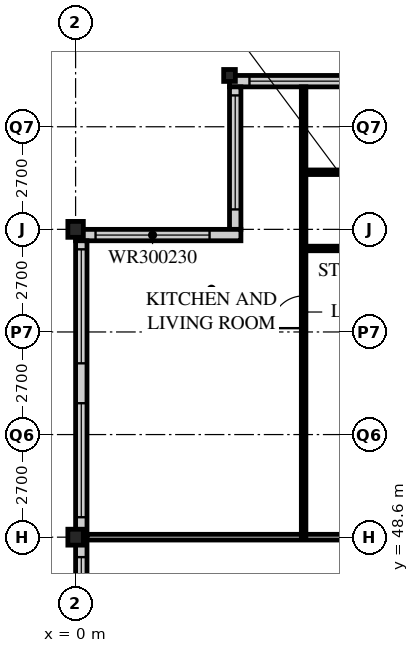
"""IFC4 building model, lengths in metres.
Left out: names, types, materials, properties, quantities, classifications, styles, units other than length and angle.
Written with IfcOpenShell. Run it as: python <this file> out.ifc"""

import sys

from ifc_helpers import new_model, si_unit, direction, frame, frame_2d, origin, origin_2d, place, context, subcontext, project, spatial, rectangle, i_section, extrude, element, fill, save


model = new_model("IFC4")
c1 = context("Model", 3, precision=1e-05, world=origin(), true_north=direction((0.0, 1.0)))
c2 = subcontext(c1, "Body", "Model", "MODEL_VIEW")
j1 = project(units=[si_unit("LENGTHUNIT", "METRE"), si_unit("PLANEANGLEUNIT", "RADIAN")], contexts=[c1])
p1 = place(None, origin())
s1 = spatial("IfcSite", under=j1, at=p1, CompositionType="ELEMENT")
p2 = place(p1, origin())
s2 = spatial("IfcBuilding", under=s1, at=p2, CompositionType="ELEMENT")
p3 = place(p2, frame((0.0, 0.0, 285.3)))
s3 = spatial("IfcBuildingStorey", under=s2, at=p3, CompositionType="ELEMENT", Elevation=285.3)
for number, where, z_axis, x_axis in (
    (1, (0.0, 48.6, 0.0), (0.0, 0.0, 1.0), (1.0, 0.0, 0.0)),
    (2, (0.0, 56.7, 0.0), (0.0, 0.0, 1.0), (1.0, 0.0, 0.0)),
):
    element("IfcColumn", number, at=place(p3, frame(where, z_axis=z_axis, x_axis=x_axis)), inside=s3, PredefinedType="COLUMN", context=c2, shape_type="SweptSolid", body=[
        extrude(i_section(OverallWidth=0.407, OverallDepth=0.419, WebThickness=0.031, FlangeThickness=0.049, FilletRadius=0.015, at=origin_2d()), origin(), (0.0, 0.0, 1.0), 3.9),
    ])
p4 = place(p3, frame((4.05, 60.75, 0.0), z_axis=(0.0, 0.0, 1.0), x_axis=(1.0, 0.0, 0.0)))
e3 = element("IfcColumn", 3, at=p4, inside=s3, PredefinedType="COLUMN", context=c2, shape_type="SweptSolid", body=[
    extrude(i_section(OverallWidth=0.307, OverallDepth=0.314, WebThickness=0.012, FlangeThickness=0.019, FilletRadius=0.015, at=origin_2d()), origin(), (0.0, 0.0, 1.0), 3.9),
])
p5 = place(p3, frame((8.4, 60.6, 0.0), z_axis=(0.0, 0.0, 1.0), x_axis=(-1.0, 0.0, 0.0)))
e4 = element("IfcWall", 4, at=p5, inside=s3, PredefinedType="SOLIDWALL", context=c2, shape_type="SweptSolid", body=[
    extrude(rectangle(XDim=4.35, YDim=0.3, at=frame_2d((2.175, 0.0))), origin(), (0.0, 0.0, 1.0), 3.69),
])
p6 = place(p5, frame((0.825, 0.0, 0.6)))
e5 = element("IfcOpeningElement", 5, at=p6, cuts=e4, PredefinedType="OPENING", context=c2, shape_type="SweptSolid", body=[
    extrude(rectangle(XDim=3.0, YDim=2.3, at=frame_2d((1.5, 1.15))), frame((0.0, 0.16, 0.0), z_axis=(0.0, -1.0, 0.0), x_axis=(1.0, 0.0, 0.0)), (0.0, 0.0, 1.0), 0.32),
])
p7 = place(p3, frame((4.2, 60.45, 0.0), z_axis=(0.0, 0.0, 1.0), x_axis=(0.0, -1.0, 0.0)))
e6 = element("IfcWall", 6, at=p7, inside=s3, PredefinedType="SOLIDWALL", context=c2, shape_type="SweptSolid", body=[
    extrude(rectangle(XDim=3.75, YDim=0.3, at=frame_2d((1.875, 0.0))), origin(), (0.0, 0.0, 1.0), 3.69),
])
p8 = place(p7, frame((0.225, 0.0, 0.6)))
e7 = element("IfcOpeningElement", 7, at=p8, cuts=e6, PredefinedType="OPENING", context=c2, shape_type="SweptSolid", body=[
    extrude(rectangle(XDim=3.0, YDim=2.3, at=frame_2d((1.5, 1.15))), frame((0.0, 0.16, 0.0), z_axis=(0.0, -1.0, 0.0), x_axis=(1.0, 0.0, 0.0)), (0.0, 0.0, 1.0), 0.32),
])
p9 = place(p3, frame((4.35, 56.55, 0.0), z_axis=(0.0, 0.0, 1.0), x_axis=(-1.0, 0.0, 0.0)))
e8 = element("IfcWall", 8, at=p9, inside=s3, PredefinedType="SOLIDWALL", context=c2, shape_type="SweptSolid", body=[
    extrude(rectangle(XDim=4.35, YDim=0.3, at=frame_2d((2.175, 0.0))), origin(), (0.0, 0.0, 1.0), 3.69),
])
p10 = place(p9, frame((0.825, 0.0, 0.6)))
e9 = element("IfcOpeningElement", 9, at=p10, cuts=e8, PredefinedType="OPENING", context=c2, shape_type="SweptSolid", body=[
    extrude(rectangle(XDim=3.0, YDim=2.3, at=frame_2d((1.5, 1.15))), frame((0.0, 0.16, 0.0), z_axis=(0.0, -1.0, 0.0), x_axis=(1.0, 0.0, 0.0)), (0.0, 0.0, 1.0), 0.32),
])
p11 = place(p3, frame((0.15, 56.4, 0.0), z_axis=(0.0, 0.0, 1.0), x_axis=(0.0, -1.0, 0.0)))
e10 = element("IfcWall", 10, at=p11, inside=s3, PredefinedType="SOLIDWALL", context=c2, shape_type="SweptSolid", body=[
    extrude(rectangle(XDim=32.1, YDim=0.3, at=frame_2d((16.05, 0.0))), origin(), (0.0, 0.0, 1.0), 3.69),
])
p12 = place(p11, frame((0.225, 0.0, 0.6)))
e11 = element("IfcOpeningElement", 11, at=p12, cuts=e10, PredefinedType="OPENING", context=c2, shape_type="SweptSolid", body=[
    extrude(rectangle(XDim=3.0, YDim=2.4, at=frame_2d((1.5, 1.2))), frame((0.0, 0.16, 0.0), z_axis=(0.0, -1.0, 0.0), x_axis=(1.0, 0.0, 0.0)), (0.0, 0.0, 1.0), 0.32),
])
p13 = place(p11, frame((4.275, 0.0, 0.6)))
e12 = element("IfcOpeningElement", 12, at=p13, cuts=e10, PredefinedType="OPENING", context=c2, shape_type="SweptSolid", body=[
    extrude(rectangle(XDim=3.0, YDim=2.4, at=frame_2d((1.5, 1.2))), frame((0.0, 0.16, 0.0), z_axis=(0.0, -1.0, 0.0), x_axis=(1.0, 0.0, 0.0)), (0.0, 0.0, 1.0), 0.32),
])
p14 = place(p11, frame((8.325, 0.0, 0.6)))
e13 = element("IfcOpeningElement", 13, at=p14, cuts=e10, PredefinedType="OPENING", context=c2, shape_type="SweptSolid", body=[
    extrude(rectangle(XDim=3.0, YDim=2.4, at=frame_2d((1.5, 1.2))), frame((0.0, 0.16, 0.0), z_axis=(0.0, -1.0, 0.0), x_axis=(1.0, 0.0, 0.0)), (0.0, 0.0, 1.0), 0.32),
])
p15 = place(p11, frame((12.375, 0.0, 0.6)))
e14 = element("IfcOpeningElement", 14, at=p15, cuts=e10, PredefinedType="OPENING", context=c2, shape_type="SweptSolid", body=[
    extrude(rectangle(XDim=3.0, YDim=2.4, at=frame_2d((1.5, 1.2))), frame((0.0, 0.16, 0.0), z_axis=(0.0, -1.0, 0.0), x_axis=(1.0, 0.0, 0.0)), (0.0, 0.0, 1.0), 0.32),
])
p16 = place(p11, frame((16.425, 0.0, 0.6)))
e15 = element("IfcOpeningElement", 15, at=p16, cuts=e10, PredefinedType="OPENING", context=c2, shape_type="SweptSolid", body=[
    extrude(rectangle(XDim=3.0, YDim=2.4, at=frame_2d((1.5, 1.2))), frame((0.0, 0.16, 0.0), z_axis=(0.0, -1.0, 0.0), x_axis=(1.0, 0.0, 0.0)), (0.0, 0.0, 1.0), 0.32),
])
p17 = place(p11, frame((20.475, 0.0, 0.6)))
e16 = element("IfcOpeningElement", 16, at=p17, cuts=e10, PredefinedType="OPENING", context=c2, shape_type="SweptSolid", body=[
    extrude(rectangle(XDim=3.0, YDim=2.4, at=frame_2d((1.5, 1.2))), frame((0.0, 0.16, 0.0), z_axis=(0.0, -1.0, 0.0), x_axis=(1.0, 0.0, 0.0)), (0.0, 0.0, 1.0), 0.32),
])
p18 = place(p11, frame((24.525, 0.0, 0.6)))
e17 = element("IfcOpeningElement", 17, at=p18, cuts=e10, PredefinedType="OPENING", context=c2, shape_type="SweptSolid", body=[
    extrude(rectangle(XDim=3.0, YDim=2.4, at=frame_2d((1.5, 1.2))), frame((0.0, 0.16, 0.0), z_axis=(0.0, -1.0, 0.0), x_axis=(1.0, 0.0, 0.0)), (0.0, 0.0, 1.0), 0.32),
])
p19 = place(p11, frame((28.575, 0.0, 0.6)))
e18 = element("IfcOpeningElement", 18, at=p19, cuts=e10, PredefinedType="OPENING", context=c2, shape_type="SweptSolid", body=[
    extrude(rectangle(XDim=3.0, YDim=2.4, at=frame_2d((1.5, 1.2))), frame((0.0, 0.16, 0.0), z_axis=(0.0, -1.0, 0.0), x_axis=(1.0, 0.0, 0.0)), (0.0, 0.0, 1.0), 0.32),
])
p20 = place(p3, frame((0.3, 48.6, 0.0), z_axis=(0.0, 0.0, 1.0), x_axis=(1.0, 0.0, 0.0)))
e19 = element("IfcWall", 19, at=p20, inside=s3, PredefinedType="PARTITIONING", context=c2, shape_type="SweptSolid", body=[
    extrude(rectangle(XDim=11.85, YDim=0.15, at=frame_2d((5.925, 0.0))), origin(), (0.0, 0.0, 1.0), 3.078),
])
p21 = place(p3, frame((6.0, 48.6, 0.0), z_axis=(0.0, 0.0, 1.0), x_axis=(0.0, 1.0, 0.0)))
e20 = element("IfcWall", 20, at=p21, inside=s3, PredefinedType="PARTITIONING", context=c2, shape_type="SweptSolid", body=[
    extrude(rectangle(XDim=11.85, YDim=0.12, at=frame_2d((5.925, 0.0))), origin(), (0.0, 0.0, 1.0), 3.69),
])
p22 = place(p21, frame((5.5, 0.0, 0.0)))
e21 = element("IfcOpeningElement", 21, at=p22, cuts=e20, PredefinedType="OPENING", context=c2, shape_type="SweptSolid", body=[
    extrude(rectangle(XDim=0.85, YDim=2.1, at=frame_2d((0.425, 1.05))), frame((0.0, 0.07, 0.0), z_axis=(0.0, -1.0, 0.0), x_axis=(1.0, 0.0, 0.0)), (0.0, 0.0, 1.0), 0.14),
])
for number, where, z_axis, x_axis in (
    (22, (6.0, 56.197, 0.0), (0.0, 0.0, 1.0), (1.0, 0.0, 0.0)),
    (23, (6.0, 58.203, 0.0), (0.0, 0.0, 1.0), (1.0, 0.0, 0.0)),
):
    element("IfcWall", number, at=place(p3, frame(where, z_axis=z_axis, x_axis=x_axis)), inside=s3, PredefinedType="PARTITIONING", context=c2, shape_type="SweptSolid", body=[
        extrude(rectangle(XDim=2.363, YDim=0.12, at=frame_2d((1.182, 0.0))), origin(), (0.0, 0.0, 1.0), 3.69),
    ])
p23 = place(p6, origin())
e24 = element("IfcWindow", 24, at=p23, inside=s3, PartitioningType="SINGLE_PANEL", PredefinedType="WINDOW", context=c2, shape_type="SweptSolid", body=[
    extrude(rectangle(XDim=3.0, YDim=2.3, at=frame_2d((1.5, 1.15))), frame((0.0, 0.03, 0.0), z_axis=(0.0, -1.0, 0.0), x_axis=(1.0, 0.0, 0.0)), (0.0, 0.0, 1.0), 0.06),
])
fill(e5, e24)
p24 = place(p8, origin())
e25 = element("IfcWindow", 25, at=p24, inside=s3, PartitioningType="SINGLE_PANEL", PredefinedType="WINDOW", context=c2, shape_type="SweptSolid", body=[
    extrude(rectangle(XDim=3.0, YDim=2.3, at=frame_2d((1.5, 1.15))), frame((0.0, 0.03, 0.0), z_axis=(0.0, -1.0, 0.0), x_axis=(1.0, 0.0, 0.0)), (0.0, 0.0, 1.0), 0.06),
])
fill(e7, e25)
p25 = place(p10, origin())
e26 = element("IfcWindow", 26, at=p25, inside=s3, PartitioningType="SINGLE_PANEL", PredefinedType="WINDOW", context=c2, shape_type="SweptSolid", body=[
    extrude(rectangle(XDim=3.0, YDim=2.3, at=frame_2d((1.5, 1.15))), frame((0.0, 0.03, 0.0), z_axis=(0.0, -1.0, 0.0), x_axis=(1.0, 0.0, 0.0)), (0.0, 0.0, 1.0), 0.06),
])
fill(e9, e26)
p26 = place(p12, origin())
e27 = element("IfcWindow", 27, at=p26, inside=s3, PartitioningType="SINGLE_PANEL", PredefinedType="WINDOW", context=c2, shape_type="SweptSolid", body=[
    extrude(rectangle(XDim=3.0, YDim=2.4, at=frame_2d((1.5, 1.2))), frame((0.0, 0.03, 0.0), z_axis=(0.0, -1.0, 0.0), x_axis=(1.0, 0.0, 0.0)), (0.0, 0.0, 1.0), 0.06),
])
fill(e11, e27)
p27 = place(p13, origin())
e28 = element("IfcWindow", 28, at=p27, inside=s3, PartitioningType="SINGLE_PANEL", PredefinedType="WINDOW", context=c2, shape_type="SweptSolid", body=[
    extrude(rectangle(XDim=3.0, YDim=2.4, at=frame_2d((1.5, 1.2))), frame((0.0, 0.03, 0.0), z_axis=(0.0, -1.0, 0.0), x_axis=(1.0, 0.0, 0.0)), (0.0, 0.0, 1.0), 0.06),
])
fill(e12, e28)
p28 = place(p14, origin())
e29 = element("IfcWindow", 29, at=p28, inside=s3, PartitioningType="SINGLE_PANEL", PredefinedType="WINDOW", context=c2, shape_type="SweptSolid", body=[
    extrude(rectangle(XDim=3.0, YDim=2.4, at=frame_2d((1.5, 1.2))), frame((0.0, 0.03, 0.0), z_axis=(0.0, -1.0, 0.0), x_axis=(1.0, 0.0, 0.0)), (0.0, 0.0, 1.0), 0.06),
])
fill(e13, e29)
p29 = place(p22, origin())
e30 = element("IfcDoor", 30, at=p29, inside=s3, OperationType="SINGLE_SWING_LEFT", PredefinedType="DOOR", context=c2, shape_type="SweptSolid", body=[
    extrude(rectangle(XDim=0.85, YDim=2.1, at=frame_2d((0.425, 1.05))), frame((0.0, 0.025, 0.0), z_axis=(0.0, -1.0, 0.0), x_axis=(1.0, 0.0, 0.0)), (0.0, 0.0, 1.0), 0.05),
])
fill(e21, e30)
save(model, sys.argv[1])
